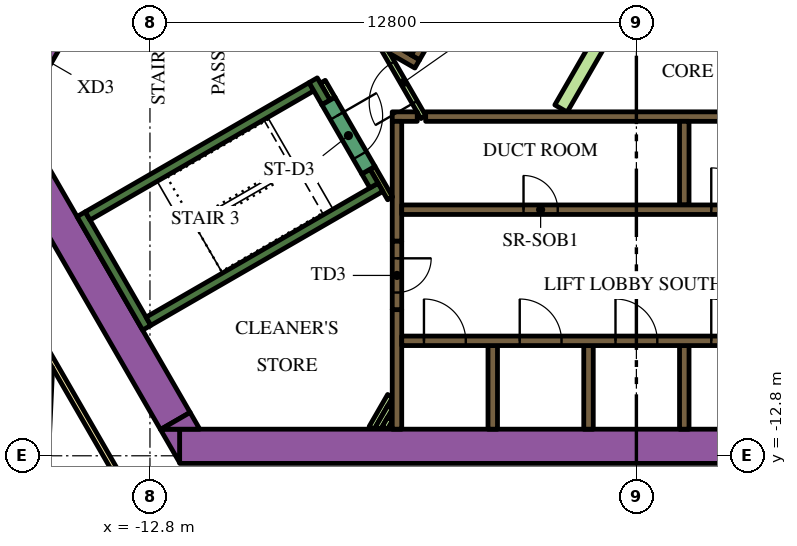
"""IFC4 building model, lengths in metres.
Left out: names, types, materials, properties, quantities, classifications, styles, units other than length and angle.
Written with IfcOpenShell. Run it as: python <this file> out.ifc"""

import sys

from ifc_helpers import new_model, si_unit, direction, frame, frame_2d, origin, place, context, subcontext, project, spatial, polyline, rectangle, outline, extrude, element, fill, save


model = new_model("IFC4")
c1 = context("Model", 3, precision=1e-05, world=origin(), true_north=direction((0.0, 1.0)))
c2 = subcontext(c1, "Body", "Model", "MODEL_VIEW")
j1 = project(units=[si_unit("LENGTHUNIT", "METRE"), si_unit("PLANEANGLEUNIT", "RADIAN")], contexts=[c1])
p1 = place(None, origin())
s1 = spatial("IfcSite", under=j1, at=p1, CompositionType="ELEMENT")
p2 = place(p1, origin())
s2 = spatial("IfcBuilding", under=s1, at=p2, CompositionType="ELEMENT")
p3 = place(p2, frame((0.0, 0.0, 31.5)))
s3 = spatial("IfcBuildingStorey", under=s2, at=p3, CompositionType="ELEMENT", Elevation=31.5)
p4 = place(p3, frame((-12.019, -12.55, 0.0), z_axis=(0.0, 0.0, 1.0), x_axis=(1.0, 0.0, 0.0)))
e1 = element("IfcWall", 1, at=p4, inside=s3, PredefinedType="SOLIDWALL", context=c2, shape_type="SweptSolid", body=[
    extrude(rectangle(XDim=21.63, YDim=0.9, at=frame_2d((10.815, 0.0))), origin(), (0.0, 0.0, 1.0), 3.9),
])
p5 = place(p3, origin())
e2 = element("IfcWall", 2, at=p5, inside=s3, PredefinedType="SOLIDWALL", context=c2, shape_type="SweptSolid", body=[
    extrude(outline(polyline([(-12.529, -12.1), (-12.021, -12.1), (-12.021, -12.98), (-12.529, -12.1)])), origin(), (0.0, 0.0, 1.0), 3.9),
])
p6 = place(p3, frame((-12.134, -11.883, 0.0), z_axis=(0.0, 0.0, 1.0), x_axis=(-0.500005339912, 0.866022320763, 0.0)))
e3 = element("IfcWall", 3, at=p6, inside=s3, PredefinedType="SOLIDWALL", context=c2, shape_type="SweptSolid", body=[
    extrude(rectangle(XDim=9.488, YDim=0.9, at=frame_2d((4.744, 0.0))), origin(), (0.0, 0.0, 1.0), 3.9),
])
e4 = element("IfcWall", 4, at=p5, inside=s3, PredefinedType="SOLIDWALL", context=c2, shape_type="SweptSolid", body=[
    extrude(outline(polyline([(-11.489, -12.1), (-12.505, -12.1), (-11.743, -11.66), (-11.489, -12.1)])), origin(), (0.0, 0.0, 1.0), 3.9),
])
p7 = place(p3, frame((-12.885, -9.431, 0.0), z_axis=(0.0, 0.0, 1.0), x_axis=(-0.500020560727, 0.866013532718, 0.0)))
e5 = element("IfcWall", 5, at=p7, inside=s3, PredefinedType="SOLIDWALL", context=c2, shape_type="SweptSolid", body=[
    extrude(rectangle(XDim=3.45, YDim=0.25, at=frame_2d((1.725, 0.0))), origin(), (0.0, 0.0, 1.0), 3.9),
])
p8 = place(p3, frame((-14.44, -6.49, 0.0), z_axis=(0.0, 0.0, 1.0), x_axis=(0.866022966069, 0.500004222222, 0.0)))
e6 = element("IfcWall", 6, at=p8, inside=s3, PredefinedType="SOLIDWALL", context=c2, shape_type="SweptSolid", body=[
    extrude(rectangle(XDim=6.8, YDim=0.25, at=frame_2d((3.4, 0.0))), origin(), (0.0, 0.0, 1.0), 3.9),
])
p9 = place(p3, frame((-8.168, -3.503, 0.0), z_axis=(0.0, 0.0, 1.0), x_axis=(-0.499952099219, 0.866053057547, 0.0)))
e7 = element("IfcWall", 7, at=p9, inside=s3, PredefinedType="SOLIDWALL", context=c2, shape_type="SweptSolid", body=[
    extrude(rectangle(XDim=0.675, YDim=0.25, at=frame_2d((0.337, 0.0))), origin(), (0.0, 0.0, 1.0), 3.9),
])
p10 = place(p3, frame((-12.84, -9.261, 0.0), z_axis=(0.0, 0.0, 1.0), x_axis=(0.866016039709, 0.500016218704, 0.0)))
e8 = element("IfcWall", 8, at=p10, inside=s3, PredefinedType="SOLIDWALL", context=c2, shape_type="SweptSolid", body=[
    extrude(rectangle(XDim=7.05, YDim=0.25, at=frame_2d((3.525, 0.0))), origin(), (0.0, 0.0, 1.0), 3.9),
])
p11 = place(p3, frame((-6.905, -5.69, 0.0), z_axis=(0.0, 0.0, 1.0), x_axis=(-0.500402024738, 0.865793170242, 0.0)))
e9 = element("IfcWall", 9, at=p11, inside=s3, PredefinedType="SOLIDWALL", context=c2, shape_type="SweptSolid", body=[
    extrude(rectangle(XDim=0.425, YDim=0.25, at=frame_2d((0.212, 0.0))), origin(), (0.0, 0.0, 1.0), 3.9),
])
p12 = place(p3, frame((-3.78, -12.1, 0.0), z_axis=(0.0, 0.0, 1.0), x_axis=(0.0, 1.0, 0.0)))
e10 = element("IfcWall", 10, at=p12, inside=s3, PredefinedType="SOLIDWALL", context=c2, shape_type="SweptSolid", body=[
    extrude(rectangle(XDim=2.2, YDim=0.25, at=frame_2d((1.1, 0.0))), origin(), (0.0, 0.0, 1.0), 3.9),
])
p13 = place(p3, frame((-6.3, -12.1, 0.0), z_axis=(0.0, 0.0, 1.0), x_axis=(0.0, 1.0, 0.0)))
e11 = element("IfcWall", 11, at=p13, inside=s3, PredefinedType="SOLIDWALL", context=c2, shape_type="SweptSolid", body=[
    extrude(rectangle(XDim=3.146, YDim=0.25, at=frame_2d((1.573, 0.0))), origin(), (0.0, 0.0, 1.0), 3.9),
])
p14 = place(p3, frame((-5.545, -3.875, 0.0), z_axis=(0.0, 0.0, 1.0), x_axis=(1.0, 0.0, 0.0)))
e12 = element("IfcWall", 12, at=p14, inside=s3, PredefinedType="SOLIDWALL", context=c2, shape_type="SweptSolid", body=[
    extrude(rectangle(XDim=11.97, YDim=0.25, at=frame_2d((5.985, 0.0))), origin(), (0.0, 0.0, 1.0), 3.9),
])
p15 = place(p3, frame((-6.425, -3.875, 0.0), z_axis=(0.0, 0.0, 1.0), x_axis=(1.0, 0.0, 0.0)))
e13 = element("IfcWall", 13, at=p15, inside=s3, PredefinedType="SOLIDWALL", context=c2, shape_type="SweptSolid", body=[
    extrude(rectangle(XDim=0.658, YDim=0.25, at=frame_2d((0.329, 0.0))), origin(), (0.0, 0.0, 1.0), 3.9),
])
p16 = place(p3, frame((1.26, -4.0, 0.0), z_axis=(0.0, 0.0, 1.0), x_axis=(0.0, -1.0, 0.0)))
e14 = element("IfcWall", 14, at=p16, inside=s3, PredefinedType="SOLIDWALL", context=c2, shape_type="SweptSolid", body=[
    extrude(rectangle(XDim=2.2, YDim=0.25, at=frame_2d((1.1, 0.0))), origin(), (0.0, 0.0, 1.0), 3.9),
])
p17 = place(p3, frame((-6.3, -4.0, 0.0), z_axis=(0.0, 0.0, 1.0), x_axis=(0.0, -1.0, 0.0)))
e15 = element("IfcWall", 15, at=p17, inside=s3, PredefinedType="SOLIDWALL", context=c2, shape_type="SweptSolid", body=[
    extrude(rectangle(XDim=3.154, YDim=0.25, at=frame_2d((1.577, 0.0))), origin(), (0.0, 0.0, 1.0), 3.9),
])
for number, where, z_axis, x_axis in (
    (16, (1.26, -12.1, 0.0), (0.0, 0.0, 1.0), (0.0, 1.0, 0.0)),
    (17, (-1.26, -12.1, 0.0), (0.0, 0.0, 1.0), (0.0, 1.0, 0.0)),
):
    element("IfcWall", number, at=place(p3, frame(where, z_axis=z_axis, x_axis=x_axis)), inside=s3, PredefinedType="SOLIDWALL", context=c2, shape_type="SweptSolid", body=[
        extrude(rectangle(XDim=2.2, YDim=0.25, at=frame_2d((1.1, 0.0))), origin(), (0.0, 0.0, 1.0), 3.9),
    ])
e18 = element("IfcWall", 18, at=p5, inside=s3, PredefinedType="SOLIDWALL", context=c2, shape_type="SweptSolid", body=[
    extrude(outline(polyline([(0.566, 6.725), (0.566, 6.875), (0.566, 6.875), (0.565, 6.875), (0.361, 6.875), (0.035, 7.439), (0.252, 7.564), (0.377, 7.348), (6.552, -3.348), (6.677, -3.564), (6.46, -3.689), (0.448, 6.725), (0.565, 6.725), (0.566, 6.725), (0.566, 6.725)])), origin(), (0.0, 0.0, 1.0), 3.9),
])
e19 = element("IfcWall", 19, at=p5, inside=s3, PredefinedType="SOLIDWALL", context=c2, shape_type="SweptSolid", body=[
    extrude(outline(polyline([(-5.922, -2.257), (-5.922, -2.257), (-5.705, -2.382), (-5.83, -2.598), (-6.483, -2.221), (-6.591, -2.033), (-6.591, -2.033), (-6.7, -2.096), (-7.952, -1.373), (-7.827, -1.156), (-5.922, -2.257)])), origin(), (0.0, 0.0, 1.0), 3.9),
])
p18 = place(p3, frame((-6.968, -12.068, 0.0), z_axis=(0.0, 0.0, 1.0), x_axis=(0.49998975084, 0.866031321059, 0.0)))
e20 = element("IfcWall", 20, at=p18, inside=s3, PredefinedType="PARTITIONING", context=c2, shape_type="SweptSolid", body=[
    extrude(rectangle(XDim=0.975, YDim=0.15, at=frame_2d((0.488, 0.0))), origin(), (0.0, 0.0, 1.0), 2.75),
])
p19 = place(p3, frame((-6.794, -12.068, 0.0), z_axis=(0.0, 0.0, 1.0), x_axis=(0.49985693963, 0.866107983974, 0.0)))
e21 = element("IfcWall", 21, at=p19, inside=s3, PredefinedType="PARTITIONING", context=c2, shape_type="SweptSolid", body=[
    extrude(rectangle(XDim=0.629, YDim=0.15, at=frame_2d((0.314, 0.0))), origin(), (0.0, 0.0, 1.0), 2.75),
])
p20 = place(p3, frame((-6.621, -12.068, 0.0), z_axis=(0.0, 0.0, 1.0), x_axis=(0.500046963369, 0.865998287773, 0.0)))
e22 = element("IfcWall", 22, at=p20, inside=s3, PredefinedType="PARTITIONING", context=c2, shape_type="SweptSolid", body=[
    extrude(rectangle(XDim=0.282, YDim=0.15, at=frame_2d((0.141, 0.0))), origin(), (0.0, 0.0, 1.0), 2.75),
])
p21 = place(p3, frame((-6.48, -6.027, 0.0), z_axis=(0.0, 0.0, 1.0), x_axis=(-0.499927229454, 0.866067413802, 0.0)))
e23 = element("IfcWall", 23, at=p21, inside=s3, PredefinedType="PARTITIONING", context=c2, shape_type="SweptSolid", body=[
    extrude(rectangle(XDim=0.929, YDim=0.15, at=frame_2d((0.464, 0.0))), origin(), (0.0, 0.0, 1.0), 3.9),
])
p22 = place(p3, frame((-8.252, -2.958, 0.0), z_axis=(0.0, 0.0, 1.0), x_axis=(0.500174715838, -0.865924508047, 0.0)))
e24 = element("IfcWall", 24, at=p22, inside=s3, PredefinedType="PARTITIONING", context=c2, shape_type="SweptSolid", body=[
    extrude(rectangle(XDim=0.514, YDim=0.15, at=frame_2d((0.257, 0.0))), origin(), (0.0, 0.0, 1.0), 2.75),
])
e25 = element("IfcWall", 25, at=p5, inside=s3, PredefinedType="PARTITIONING", context=c2, shape_type="SweptSolid", body=[
    extrude(outline(polyline([(-0.59, -0.872), (-0.265, -1.059), (-1.822, -3.756), (-2.147, -3.568), (-0.59, -0.872)])), origin(), (0.0, 0.0, 1.0), 2.75),
])
p23 = place(p3, frame((-6.175, -9.775, 0.0), z_axis=(0.0, 0.0, 1.0), x_axis=(1.0, 0.0, 0.0)))
e26 = element("IfcWall", 26, at=p23, inside=s3, PredefinedType="SOLIDWALL", context=c2, shape_type="SweptSolid", body=[
    extrude(rectangle(XDim=12.35, YDim=0.25, at=frame_2d((6.175, 0.0))), origin(), (0.0, 0.0, 1.0), 3.9),
])
p24 = place(p23, frame((0.585, 0.0, 0.0)))
e27 = element("IfcOpeningElement", 27, at=p24, cuts=e26, PredefinedType="OPENING", context=c2, shape_type="SweptSolid", body=[
    extrude(rectangle(XDim=1.1, YDim=2.1, at=frame_2d((0.55, 1.05))), frame((0.0, 0.135, 0.0), z_axis=(0.0, -1.0, 0.0), x_axis=(1.0, 0.0, 0.0)), (0.0, 0.0, 1.0), 0.27),
])
p25 = place(p23, frame((3.105, 0.0, 0.0)))
e28 = element("IfcOpeningElement", 28, at=p25, cuts=e26, PredefinedType="OPENING", context=c2, shape_type="SweptSolid", body=[
    extrude(rectangle(XDim=1.1, YDim=2.1, at=frame_2d((0.55, 1.05))), frame((0.0, 0.135, 0.0), z_axis=(0.0, -1.0, 0.0), x_axis=(1.0, 0.0, 0.0)), (0.0, 0.0, 1.0), 0.27),
])
p26 = place(p23, frame((5.625, 0.0, 0.0)))
e29 = element("IfcOpeningElement", 29, at=p26, cuts=e26, PredefinedType="OPENING", context=c2, shape_type="SweptSolid", body=[
    extrude(rectangle(XDim=1.1, YDim=2.1, at=frame_2d((0.55, 1.05))), frame((0.0, 0.135, 0.0), z_axis=(0.0, -1.0, 0.0), x_axis=(1.0, 0.0, 0.0)), (0.0, 0.0, 1.0), 0.27),
])
p27 = place(p23, frame((8.145, 0.0, 0.0)))
e30 = element("IfcOpeningElement", 30, at=p27, cuts=e26, PredefinedType="OPENING", context=c2, shape_type="SweptSolid", body=[
    extrude(rectangle(XDim=1.1, YDim=2.1, at=frame_2d((0.55, 1.05))), frame((0.0, 0.135, 0.0), z_axis=(0.0, -1.0, 0.0), x_axis=(1.0, 0.0, 0.0)), (0.0, 0.0, 1.0), 0.27),
])
p28 = place(p23, frame((10.665, 0.0, 0.0)))
e31 = element("IfcOpeningElement", 31, at=p28, cuts=e26, PredefinedType="OPENING", context=c2, shape_type="SweptSolid", body=[
    extrude(rectangle(XDim=1.1, YDim=2.1, at=frame_2d((0.55, 1.05))), frame((0.0, 0.135, 0.0), z_axis=(0.0, -1.0, 0.0), x_axis=(1.0, 0.0, 0.0)), (0.0, 0.0, 1.0), 0.27),
])
p29 = place(p3, frame((-6.175, -6.325, 0.0), z_axis=(0.0, 0.0, 1.0), x_axis=(1.0, 0.0, 0.0)))
e32 = element("IfcWall", 32, at=p29, inside=s3, PredefinedType="SOLIDWALL", context=c2, shape_type="SweptSolid", body=[
    extrude(rectangle(XDim=12.35, YDim=0.25, at=frame_2d((6.175, 0.0))), origin(), (0.0, 0.0, 1.0), 3.9),
])
p30 = place(p29, frame((3.205, 0.0, 0.0)))
e33 = element("IfcOpeningElement", 33, at=p30, cuts=e32, PredefinedType="OPENING", context=c2, shape_type="SweptSolid", body=[
    extrude(rectangle(XDim=0.9, YDim=2.1, at=frame_2d((0.45, 1.05))), frame((0.0, 0.135, 0.0), z_axis=(0.0, -1.0, 0.0), x_axis=(1.0, 0.0, 0.0)), (0.0, 0.0, 1.0), 0.27),
])
p31 = place(p29, frame((8.145, 0.0, 0.0)))
e34 = element("IfcOpeningElement", 34, at=p31, cuts=e32, PredefinedType="OPENING", context=c2, shape_type="SweptSolid", body=[
    extrude(rectangle(XDim=1.1, YDim=2.1, at=frame_2d((0.55, 1.05))), frame((0.0, 0.135, 0.0), z_axis=(0.0, -1.0, 0.0), x_axis=(1.0, 0.0, 0.0)), (0.0, 0.0, 1.0), 0.27),
])
p32 = place(p29, frame((10.665, 0.0, 0.0)))
e35 = element("IfcOpeningElement", 35, at=p32, cuts=e32, PredefinedType="OPENING", context=c2, shape_type="SweptSolid", body=[
    extrude(rectangle(XDim=1.1, YDim=2.1, at=frame_2d((0.55, 1.05))), frame((0.0, 0.135, 0.0), z_axis=(0.0, -1.0, 0.0), x_axis=(1.0, 0.0, 0.0)), (0.0, 0.0, 1.0), 0.27),
])
p33 = place(p3, frame((-0.898, 6.194, 0.0), z_axis=(0.0, 0.0, 1.0), x_axis=(-0.499996202215, -0.866027596426, 0.0)))
e36 = element("IfcWall", 36, at=p33, inside=s3, PredefinedType="SOLIDWALL", context=c2, shape_type="SweptSolid", body=[
    extrude(rectangle(XDim=9.83, YDim=0.25, at=frame_2d((4.915, 0.0))), origin(), (0.0, 0.0, 1.0), 3.9),
])
p34 = place(p33, frame((0.585, 0.0, 0.0)))
e37 = element("IfcOpeningElement", 37, at=p34, cuts=e36, PredefinedType="OPENING", context=c2, shape_type="SweptSolid", body=[
    extrude(rectangle(XDim=1.1, YDim=2.1, at=frame_2d((0.55, 1.05))), frame((0.0, 0.135, 0.0), z_axis=(0.0, -1.0, 0.0), x_axis=(1.0, 0.0, 0.0)), (0.0, 0.0, 1.0), 0.27),
])
p35 = place(p33, frame((3.105, 0.0, 0.0)))
e38 = element("IfcOpeningElement", 38, at=p35, cuts=e36, PredefinedType="OPENING", context=c2, shape_type="SweptSolid", body=[
    extrude(rectangle(XDim=1.1, YDim=2.1, at=frame_2d((0.55, 1.05))), frame((0.0, 0.135, 0.0), z_axis=(0.0, -1.0, 0.0), x_axis=(1.0, 0.0, 0.0)), (0.0, 0.0, 1.0), 0.27),
])
p36 = place(p33, frame((5.625, 0.0, 0.0)))
e39 = element("IfcOpeningElement", 39, at=p36, cuts=e36, PredefinedType="OPENING", context=c2, shape_type="SweptSolid", body=[
    extrude(rectangle(XDim=1.1, YDim=2.1, at=frame_2d((0.55, 1.05))), frame((0.0, 0.135, 0.0), z_axis=(0.0, -1.0, 0.0), x_axis=(1.0, 0.0, 0.0)), (0.0, 0.0, 1.0), 0.27),
])
p37 = place(p33, frame((8.145, 0.0, 0.0)))
e40 = element("IfcOpeningElement", 40, at=p37, cuts=e36, PredefinedType="OPENING", context=c2, shape_type="SweptSolid", body=[
    extrude(rectangle(XDim=1.1, YDim=2.1, at=frame_2d((0.55, 1.05))), frame((0.0, 0.135, 0.0), z_axis=(0.0, -1.0, 0.0), x_axis=(1.0, 0.0, 0.0)), (0.0, 0.0, 1.0), 0.27),
])
p38 = place(p3, frame((-8.103, -3.466, 0.0), z_axis=(0.0, 0.0, 1.0), x_axis=(0.500078061341, -0.865980330357, 0.0)))
e41 = element("IfcWall", 41, at=p38, inside=s3, PredefinedType="SOLIDWALL", context=c2, shape_type="SweptSolid", body=[
    extrude(rectangle(XDim=2.1, YDim=0.4, at=frame_2d((1.05, 0.0))), origin(), (0.0, 0.0, 1.0), 3.9),
])
p39 = place(p38, frame((0.45, 0.0, 0.0)))
e42 = element("IfcOpeningElement", 42, at=p39, cuts=e41, PredefinedType="OPENING", context=c2, shape_type="SweptSolid", body=[
    extrude(rectangle(XDim=1.2, YDim=2.1, at=frame_2d((0.6, 1.05))), frame((0.0, 0.21, 0.0), z_axis=(0.0, -1.0, 0.0), x_axis=(1.0, 0.0, 0.0)), (0.0, 0.0, 1.0), 0.42),
])
p40 = place(p3, frame((-6.3, -7.154, 0.0), z_axis=(0.0, 0.0, 1.0), x_axis=(0.0, -1.0, 0.0)))
e43 = element("IfcWall", 43, at=p40, inside=s3, PredefinedType="SOLIDWALL", context=c2, shape_type="SweptSolid", body=[
    extrude(rectangle(XDim=1.8, YDim=0.25, at=frame_2d((0.9, 0.0))), origin(), (0.0, 0.0, 1.0), 3.9),
])
p41 = place(p40, frame((0.45, 0.0, 0.0)))
e44 = element("IfcOpeningElement", 44, at=p41, cuts=e43, PredefinedType="OPENING", context=c2, shape_type="SweptSolid", body=[
    extrude(rectangle(XDim=0.9, YDim=2.1, at=frame_2d((0.45, 1.05))), frame((0.0, 0.135, 0.0), z_axis=(0.0, -1.0, 0.0), x_axis=(1.0, 0.0, 0.0)), (0.0, 0.0, 1.0), 0.27),
])
p42 = place(p3, frame((-5.606, -3.89, 0.0), z_axis=(0.0, 0.0, 1.0), x_axis=(-0.500027713859, 0.866009402589, 0.0)))
e45 = element("IfcWall", 45, at=p42, inside=s3, PredefinedType="PARTITIONING", context=c2, shape_type="SweptSolid", body=[
    extrude(rectangle(XDim=2.1, YDim=0.15, at=frame_2d((1.05, 0.0))), origin(), (0.0, 0.0, 1.0), 2.75),
])
p43 = place(p42, frame((0.45, 0.0, 0.0)))
e46 = element("IfcOpeningElement", 46, at=p43, cuts=e45, PredefinedType="OPENING", context=c2, shape_type="SweptSolid", body=[
    extrude(rectangle(XDim=1.2, YDim=2.1, at=frame_2d((0.6, 1.05))), frame((0.0, 0.085, 0.0), z_axis=(0.0, -1.0, 0.0), x_axis=(1.0, 0.0, 0.0)), (0.0, 0.0, 1.0), 0.17),
])
p44 = place(p3, frame((-16.209, -2.976, 0.0), z_axis=(0.0, 0.0, 1.0), x_axis=(0.499954529098, 0.86605165483, 0.0)))
e47 = element("IfcWall", 47, at=p44, inside=s3, PredefinedType="SOLIDWALL", context=c2, shape_type="SweptSolid", body=[
    extrude(rectangle(XDim=1.7, YDim=0.9, at=frame_2d((0.85, 0.0))), origin(), (0.0, 0.0, 1.0), 3.9),
])
p45 = place(p44, frame((0.25, 0.0, 0.0)))
e48 = element("IfcOpeningElement", 48, at=p45, cuts=e47, PredefinedType="OPENING", context=c2, shape_type="SweptSolid", body=[
    extrude(rectangle(XDim=1.2, YDim=2.1, at=frame_2d((0.6, 1.05))), frame((0.0, 0.46, 0.0), z_axis=(0.0, -1.0, 0.0), x_axis=(1.0, 0.0, 0.0)), (0.0, 0.0, 1.0), 0.92),
])
p46 = place(p3, frame((-19.081, -3.9, 0.0), z_axis=(0.0, 0.0, 1.0), x_axis=(0.499998313975, 0.866026377209, 0.0)))
e49 = element("IfcWall", 49, at=p46, inside=s3, PredefinedType="PARTITIONING", context=c2, shape_type="SweptSolid", body=[
    extrude(rectangle(XDim=25.766, YDim=0.15, at=frame_2d((12.883, 0.0))), origin(), (0.0, 0.0, 1.0), 2.75),
])
p47 = place(p46, frame((24.586, 0.0, 0.0)))
e50 = element("IfcOpeningElement", 50, at=p47, cuts=e49, PredefinedType="OPENING", context=c2, shape_type="SweptSolid", body=[
    extrude(rectangle(XDim=1.0, YDim=2.1, at=frame_2d((0.5, 1.05))), frame((0.0, 0.085, 0.0), z_axis=(0.0, -1.0, 0.0), x_axis=(1.0, 0.0, 0.0)), (0.0, 0.0, 1.0), 0.17),
])
p48 = place(p46, frame((16.196, 0.0, 0.0)))
e51 = element("IfcOpeningElement", 51, at=p48, cuts=e49, PredefinedType="OPENING", context=c2, shape_type="SweptSolid", body=[
    extrude(rectangle(XDim=1.0, YDim=2.1, at=frame_2d((0.5, 1.05))), frame((0.0, 0.085, 0.0), z_axis=(0.0, -1.0, 0.0), x_axis=(1.0, 0.0, 0.0)), (0.0, 0.0, 1.0), 0.17),
])
p49 = place(p46, frame((14.789, 0.0, 0.0)))
e52 = element("IfcOpeningElement", 52, at=p49, cuts=e49, PredefinedType="OPENING", context=c2, shape_type="SweptSolid", body=[
    extrude(rectangle(XDim=1.1, YDim=2.1, at=frame_2d((0.55, 1.05))), frame((0.0, 0.085, 0.0), z_axis=(0.0, -1.0, 0.0), x_axis=(1.0, 0.0, 0.0)), (0.0, 0.0, 1.0), 0.17),
])
p50 = place(p46, frame((3.698, 0.0, 0.0)))
e53 = element("IfcOpeningElement", 53, at=p50, cuts=e49, PredefinedType="OPENING", context=c2, shape_type="SweptSolid", body=[
    extrude(rectangle(XDim=1.0, YDim=2.1, at=frame_2d((0.5, 1.05))), frame((0.0, 0.085, 0.0), z_axis=(0.0, -1.0, 0.0), x_axis=(1.0, 0.0, 0.0)), (0.0, 0.0, 1.0), 0.17),
])
p51 = place(p46, frame((1.531, 0.0, 0.0)))
e54 = element("IfcOpeningElement", 54, at=p51, cuts=e49, PredefinedType="OPENING", context=c2, shape_type="SweptSolid", body=[
    extrude(rectangle(XDim=0.9, YDim=2.1, at=frame_2d((0.45, 1.05))), frame((0.0, 0.085, 0.0), z_axis=(0.0, -1.0, 0.0), x_axis=(1.0, 0.0, 0.0)), (0.0, 0.0, 1.0), 0.17),
])
p52 = place(p3, frame((-12.918, -14.575, 0.0), z_axis=(0.0, 0.0, 1.0), x_axis=(-0.500009150678, 0.866020120573, 0.0)))
e55 = element("IfcWall", 55, at=p52, inside=s3, PredefinedType="PARTITIONING", context=c2, shape_type="SweptSolid", body=[
    extrude(rectangle(XDim=5.258, YDim=0.15, at=frame_2d((2.629, 0.0))), origin(), (0.0, 0.0, 1.0), 2.75),
])
p53 = place(p3, frame((-15.973, -22.109, 0.0), z_axis=(0.0, 0.0, 1.0), x_axis=(0.046191717129, 0.998932592955, 0.0)))
e56 = element("IfcWall", 56, at=p53, inside=s3, PredefinedType="PARTITIONING", context=c2, shape_type="SweptSolid", body=[
    extrude(rectangle(XDim=11.638, YDim=0.15, at=frame_2d((5.819, 0.0))), origin(), (0.0, 0.0, 1.0), 2.75),
])
p54 = place(p24, origin())
e57 = element("IfcDoor", 57, at=p54, inside=s3, OperationType="DOUBLE_DOOR_SLIDING", PredefinedType="DOOR", context=c2, shape_type="SweptSolid", body=[
    extrude(rectangle(XDim=1.1, YDim=2.1, at=frame_2d((0.55, 1.05))), frame((0.0, 0.025, 0.0), z_axis=(0.0, -1.0, 0.0), x_axis=(1.0, 0.0, 0.0)), (0.0, 0.0, 1.0), 0.05),
])
fill(e27, e57)
p55 = place(p25, origin())
e58 = element("IfcDoor", 58, at=p55, inside=s3, OperationType="DOUBLE_DOOR_SLIDING", PredefinedType="DOOR", context=c2, shape_type="SweptSolid", body=[
    extrude(rectangle(XDim=1.1, YDim=2.1, at=frame_2d((0.55, 1.05))), frame((0.0, 0.025, 0.0), z_axis=(0.0, -1.0, 0.0), x_axis=(1.0, 0.0, 0.0)), (0.0, 0.0, 1.0), 0.05),
])
fill(e28, e58)
p56 = place(p26, origin())
e59 = element("IfcDoor", 59, at=p56, inside=s3, OperationType="DOUBLE_DOOR_SLIDING", PredefinedType="DOOR", context=c2, shape_type="SweptSolid", body=[
    extrude(rectangle(XDim=1.1, YDim=2.1, at=frame_2d((0.55, 1.05))), frame((0.0, 0.025, 0.0), z_axis=(0.0, -1.0, 0.0), x_axis=(1.0, 0.0, 0.0)), (0.0, 0.0, 1.0), 0.05),
])
fill(e29, e59)
p57 = place(p27, origin())
e60 = element("IfcDoor", 60, at=p57, inside=s3, OperationType="DOUBLE_DOOR_SLIDING", PredefinedType="DOOR", context=c2, shape_type="SweptSolid", body=[
    extrude(rectangle(XDim=1.1, YDim=2.1, at=frame_2d((0.55, 1.05))), frame((0.0, 0.025, 0.0), z_axis=(0.0, -1.0, 0.0), x_axis=(1.0, 0.0, 0.0)), (0.0, 0.0, 1.0), 0.05),
])
fill(e30, e60)
p58 = place(p30, origin())
e61 = element("IfcDoor", 61, at=p58, inside=s3, OperationType="SINGLE_SWING_LEFT", PredefinedType="DOOR", context=c2, shape_type="SweptSolid", body=[
    extrude(rectangle(XDim=0.9, YDim=2.1, at=frame_2d((0.45, 1.05))), frame((0.0, 0.025, 0.0), z_axis=(0.0, -1.0, 0.0), x_axis=(1.0, 0.0, 0.0)), (0.0, 0.0, 1.0), 0.05),
])
fill(e33, e61)
p59 = place(p31, origin())
e62 = element("IfcDoor", 62, at=p59, inside=s3, OperationType="DOUBLE_DOOR_SLIDING", PredefinedType="DOOR", context=c2, shape_type="SweptSolid", body=[
    extrude(rectangle(XDim=1.1, YDim=2.1, at=frame_2d((0.55, 1.05))), frame((0.0, 0.025, 0.0), z_axis=(0.0, -1.0, 0.0), x_axis=(1.0, 0.0, 0.0)), (0.0, 0.0, 1.0), 0.05),
])
fill(e34, e62)
p60 = place(p39, origin())
e63 = element("IfcDoor", 63, at=p60, inside=s3, OperationType="SINGLE_SWING_LEFT", PredefinedType="DOOR", context=c2, shape_type="SweptSolid", body=[
    extrude(rectangle(XDim=1.2, YDim=2.1, at=frame_2d((0.6, 1.05))), frame((0.0, 0.025, 0.0), z_axis=(0.0, -1.0, 0.0), x_axis=(1.0, 0.0, 0.0)), (0.0, 0.0, 1.0), 0.05),
])
fill(e42, e63)
p61 = place(p41, origin())
e64 = element("IfcDoor", 64, at=p61, inside=s3, OperationType="SINGLE_SWING_LEFT", PredefinedType="DOOR", context=c2, shape_type="SweptSolid", body=[
    extrude(rectangle(XDim=0.9, YDim=2.1, at=frame_2d((0.45, 1.05))), frame((0.0, 0.025, 0.0), z_axis=(0.0, -1.0, 0.0), x_axis=(1.0, 0.0, 0.0)), (0.0, 0.0, 1.0), 0.05),
])
fill(e44, e64)
p62 = place(p43, origin())
e65 = element("IfcDoor", 65, at=p62, inside=s3, OperationType="SINGLE_SWING_LEFT", PredefinedType="DOOR", context=c2, shape_type="SweptSolid", body=[
    extrude(rectangle(XDim=1.2, YDim=2.1, at=frame_2d((0.6, 1.05))), frame((0.0, 0.025, 0.0), z_axis=(0.0, -1.0, 0.0), x_axis=(1.0, 0.0, 0.0)), (0.0, 0.0, 1.0), 0.05),
])
fill(e46, e65)
save(model, sys.argv[1])
